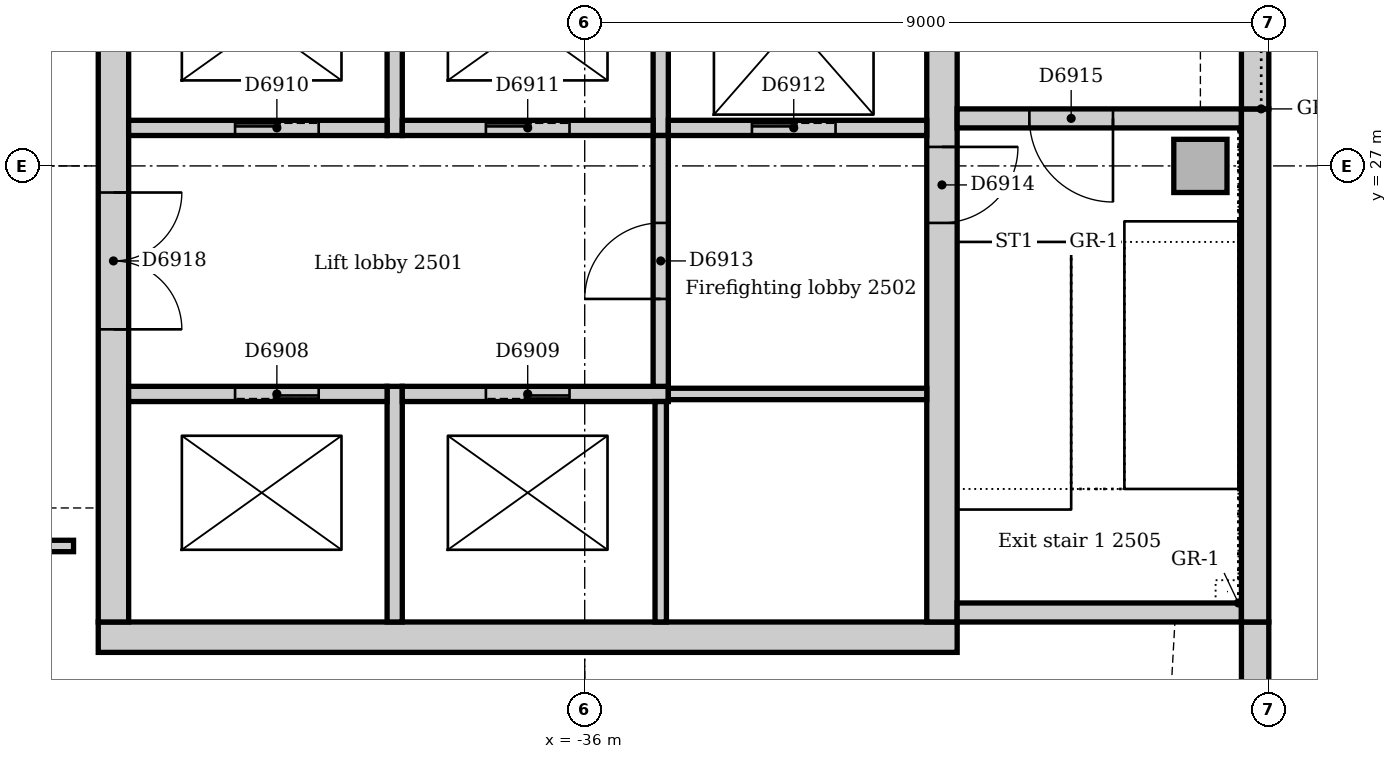
"""IFC4 building model, lengths in metres.
Left out: names, types, materials, properties, quantities, classifications, styles, units other than length and angle.
Written with IfcOpenShell. Run it as: python <this file> out.ifc"""

import sys

from ifc_helpers import new_model, si_unit, direction, frame, frame_2d, origin, origin_2d, place, context, subcontext, project, spatial, rectangle, extrude, element, fill, save


model = new_model("IFC4")
c1 = context("Model", 3, precision=1e-05, world=origin(), true_north=direction((0.0, 1.0)))
c2 = subcontext(c1, "Body", "Model", "MODEL_VIEW")
j1 = project(units=[si_unit("LENGTHUNIT", "METRE"), si_unit("PLANEANGLEUNIT", "RADIAN")], contexts=[c1])
p1 = place(None, origin())
s1 = spatial("IfcSite", under=j1, at=p1, CompositionType="ELEMENT")
p2 = place(p1, origin())
s2 = spatial("IfcBuilding", under=s1, at=p2, CompositionType="ELEMENT")
p3 = place(p2, frame((0.0, 0.0, 108.0)))
s3 = spatial("IfcBuildingStorey", under=s2, at=p3, CompositionType="ELEMENT", Elevation=108.0)
p4 = place(p3, frame((-42.4, 20.8, 0.0), z_axis=(0.0, 0.0, 1.0), x_axis=(1.0, 0.0, 0.0)))
e1 = element("IfcWall", 1, at=p4, inside=s3, PredefinedType="SOLIDWALL", context=c2, shape_type="SweptSolid", body=[
    extrude(rectangle(XDim=11.3, YDim=0.4, at=frame_2d((5.65, 0.0))), origin(), (0.0, 0.0, 1.0), 4.0),
])
p5 = place(p3, frame((-31.3, 21.0, 0.0), z_axis=(0.0, 0.0, 1.0), x_axis=(0.0, 1.0, 0.0)))
e2 = element("IfcWall", 2, at=p5, inside=s3, PredefinedType="SOLIDWALL", context=c2, shape_type="SweptSolid", body=[
    extrude(rectangle(XDim=9.5, YDim=0.4, at=frame_2d((4.75, 0.0))), origin(), (0.0, 0.0, 1.0), 4.0),
])
p6 = place(p5, frame((5.25, 0.0, 0.0)))
e3 = element("IfcOpeningElement", 3, at=p6, cuts=e2, PredefinedType="OPENING", context=c2, shape_type="SweptSolid", body=[
    extrude(rectangle(XDim=1.0, YDim=2.1, at=frame_2d((0.5, 1.05))), frame((0.0, 0.21, 0.0), z_axis=(0.0, -1.0, 0.0), x_axis=(1.0, 0.0, 0.0)), (0.0, 0.0, 1.0), 0.42),
])
p7 = place(p3, frame((-42.2, 30.5, 0.0), z_axis=(0.0, 0.0, 1.0), x_axis=(0.0, -1.0, 0.0)))
e4 = element("IfcWall", 4, at=p7, inside=s3, PredefinedType="SOLIDWALL", context=c2, shape_type="SweptSolid", body=[
    extrude(rectangle(XDim=9.5, YDim=0.4, at=frame_2d((4.75, 0.0))), origin(), (0.0, 0.0, 1.0), 4.0),
])
p8 = place(p7, frame((3.85, 0.0, 0.0)))
e5 = element("IfcOpeningElement", 5, at=p8, cuts=e4, PredefinedType="OPENING", context=c2, shape_type="SweptSolid", body=[
    extrude(rectangle(XDim=1.8, YDim=2.1, at=frame_2d((0.9, 1.05))), frame((0.0, 0.21, 0.0), z_axis=(0.0, -1.0, 0.0), x_axis=(1.0, 0.0, 0.0)), (0.0, 0.0, 1.0), 0.42),
])
p9 = place(p3, frame((-31.1, 21.125, 0.0), z_axis=(0.0, 0.0, 1.0), x_axis=(1.0, 0.0, 0.0)))
e6 = element("IfcWall", 6, at=p9, inside=s3, PredefinedType="SOLIDWALL", context=c2, shape_type="SweptSolid", body=[
    extrude(rectangle(XDim=3.74, YDim=0.25, at=frame_2d((1.87, 0.0))), origin(), (0.0, 0.0, 1.0), 4.0),
])
p10 = place(p3, frame((-27.36, 27.625, 0.0), z_axis=(0.0, 0.0, 1.0), x_axis=(-1.0, 0.0, 0.0)))
e7 = element("IfcWall", 7, at=p10, inside=s3, PredefinedType="SOLIDWALL", context=c2, shape_type="SweptSolid", body=[
    extrude(rectangle(XDim=3.74, YDim=0.25, at=frame_2d((1.87, 0.0))), origin(), (0.0, 0.0, 1.0), 4.0),
])
p11 = place(p10, frame((1.69, 0.0, 0.0)))
e8 = element("IfcOpeningElement", 8, at=p11, cuts=e7, PredefinedType="OPENING", context=c2, shape_type="SweptSolid", body=[
    extrude(rectangle(XDim=1.1, YDim=2.1, at=frame_2d((0.55, 1.05))), frame((0.0, 0.135, 0.0), z_axis=(0.0, -1.0, 0.0), x_axis=(1.0, 0.0, 0.0)), (0.0, 0.0, 1.0), 0.27),
])
p12 = place(p3, frame((-27.9, 27.0, 0.0), z_axis=(0.0, 0.0, 1.0), x_axis=(1.0, 0.0, 0.0)))
e9 = element("IfcColumn", 9, at=p12, inside=s3, PredefinedType="COLUMN", context=c2, shape_type="SweptSolid", body=[
    extrude(rectangle(XDim=0.7, YDim=0.7, at=origin_2d()), origin(), (0.0, 0.0, 1.0), 4.0),
])
p13 = place(p3, frame((-27.18, 17.743, 0.0), z_axis=(0.0, 0.0, 1.0), x_axis=(0.0, 1.0, 0.0)))
e10 = element("IfcWall", 10, at=p13, inside=s3, PredefinedType="STANDARD", context=c2, shape_type="SweptSolid", body=[
    extrude(rectangle(XDim=3.257, YDim=0.36, at=frame_2d((1.629, 0.0))), origin(), (0.0, 0.0, 1.0), 3.85),
])
p14 = place(p3, frame((-27.18, 21.0, 0.0), z_axis=(0.0, 0.0, 1.0), x_axis=(0.0, 1.0, 0.0)))
e11 = element("IfcWall", 11, at=p14, inside=s3, PredefinedType="STANDARD", context=c2, shape_type="SweptSolid", body=[
    extrude(rectangle(XDim=6.75, YDim=0.36, at=frame_2d((3.375, 0.0))), origin(), (0.0, 0.0, 1.0), 3.85),
])
p15 = place(p3, frame((-27.18, 27.75, 0.0), z_axis=(0.0, 0.0, 1.0), x_axis=(0.0, 1.0, 0.0)))
e12 = element("IfcWall", 12, at=p15, inside=s3, PredefinedType="STANDARD", context=c2, shape_type="SweptSolid", body=[
    extrude(rectangle(XDim=7.5, YDim=0.36, at=frame_2d((3.75, 0.0))), origin(), (0.0, 0.0, 1.0), 3.85),
])
p16 = place(p15, frame((2.85, 0.0, 1.2)))
e13 = element("IfcOpeningElement", 13, at=p16, cuts=e12, PredefinedType="OPENING", context=c2, shape_type="SweptSolid", body=[
    extrude(rectangle(XDim=1.8, YDim=1.2, at=frame_2d((0.9, 0.6))), frame((0.0, 0.19, 0.0), z_axis=(0.0, -1.0, 0.0), x_axis=(1.0, 0.0, 0.0)), (0.0, 0.0, 1.0), 0.38),
])
p17 = place(p3, frame((-38.5, 21.0, 0.0), z_axis=(0.0, 0.0, 1.0), x_axis=(0.0, 1.0, 0.0)))
e14 = element("IfcWall", 14, at=p17, inside=s3, PredefinedType="SOLIDWALL", context=c2, shape_type="SweptSolid", body=[
    extrude(rectangle(XDim=3.1, YDim=0.2, at=frame_2d((1.55, 0.0))), origin(), (0.0, 0.0, 1.0), 4.0),
])
p18 = place(p3, frame((-38.6, 24.0, 0.0), z_axis=(0.0, 0.0, 1.0), x_axis=(-1.0, 0.0, 0.0)))
e15 = element("IfcWall", 15, at=p18, inside=s3, PredefinedType="SOLIDWALL", context=c2, shape_type="SweptSolid", body=[
    extrude(rectangle(XDim=3.4, YDim=0.2, at=frame_2d((1.7, 0.0))), origin(), (0.0, 0.0, 1.0), 4.0),
])
p19 = place(p18, frame((0.9, 0.0, 0.0)))
e16 = element("IfcOpeningElement", 16, at=p19, cuts=e15, PredefinedType="OPENING", context=c2, shape_type="SweptSolid", body=[
    extrude(rectangle(XDim=1.1, YDim=2.1, at=frame_2d((0.55, 1.05))), frame((0.0, 0.11, 0.0), z_axis=(0.0, -1.0, 0.0), x_axis=(1.0, 0.0, 0.0)), (0.0, 0.0, 1.0), 0.22),
])
p20 = place(p3, frame((-34.9, 24.0, 0.0), z_axis=(0.0, 0.0, 1.0), x_axis=(-1.0, 0.0, 0.0)))
e17 = element("IfcWall", 17, at=p20, inside=s3, PredefinedType="SOLIDWALL", context=c2, shape_type="SweptSolid", body=[
    extrude(rectangle(XDim=3.5, YDim=0.2, at=frame_2d((1.75, 0.0))), origin(), (0.0, 0.0, 1.0), 4.0),
])
p21 = place(p20, frame((1.3, 0.0, 0.0)))
e18 = element("IfcOpeningElement", 18, at=p21, cuts=e17, PredefinedType="OPENING", context=c2, shape_type="SweptSolid", body=[
    extrude(rectangle(XDim=1.1, YDim=2.1, at=frame_2d((0.55, 1.05))), frame((0.0, 0.11, 0.0), z_axis=(0.0, -1.0, 0.0), x_axis=(1.0, 0.0, 0.0)), (0.0, 0.0, 1.0), 0.22),
])
p22 = place(p3, frame((-38.5, 27.4, 0.0), z_axis=(0.0, 0.0, 1.0), x_axis=(0.0, 1.0, 0.0)))
e19 = element("IfcWall", 19, at=p22, inside=s3, PredefinedType="SOLIDWALL", context=c2, shape_type="SweptSolid", body=[
    extrude(rectangle(XDim=2.85, YDim=0.2, at=frame_2d((1.425, 0.0))), origin(), (0.0, 0.0, 1.0), 4.0),
])
p23 = place(p3, frame((-42.0, 27.5, 0.0), z_axis=(0.0, 0.0, 1.0), x_axis=(1.0, 0.0, 0.0)))
e20 = element("IfcWall", 20, at=p23, inside=s3, PredefinedType="SOLIDWALL", context=c2, shape_type="SweptSolid", body=[
    extrude(rectangle(XDim=3.4, YDim=0.2, at=frame_2d((1.7, 0.0))), origin(), (0.0, 0.0, 1.0), 4.0),
])
p24 = place(p23, frame((1.4, 0.0, 0.0)))
e21 = element("IfcOpeningElement", 21, at=p24, cuts=e20, PredefinedType="OPENING", context=c2, shape_type="SweptSolid", body=[
    extrude(rectangle(XDim=1.1, YDim=2.1, at=frame_2d((0.55, 1.05))), frame((0.0, 0.11, 0.0), z_axis=(0.0, -1.0, 0.0), x_axis=(1.0, 0.0, 0.0)), (0.0, 0.0, 1.0), 0.22),
])
p25 = place(p3, frame((-35.0, 27.4, 0.0), z_axis=(0.0, 0.0, 1.0), x_axis=(0.0, 1.0, 0.0)))
e22 = element("IfcWall", 22, at=p25, inside=s3, PredefinedType="SOLIDWALL", context=c2, shape_type="SweptSolid", body=[
    extrude(rectangle(XDim=2.85, YDim=0.2, at=frame_2d((1.425, 0.0))), origin(), (0.0, 0.0, 1.0), 4.0),
])
p26 = place(p3, frame((-38.4, 27.5, 0.0), z_axis=(0.0, 0.0, 1.0), x_axis=(1.0, 0.0, 0.0)))
e23 = element("IfcWall", 23, at=p26, inside=s3, PredefinedType="SOLIDWALL", context=c2, shape_type="SweptSolid", body=[
    extrude(rectangle(XDim=3.3, YDim=0.2, at=frame_2d((1.65, 0.0))), origin(), (0.0, 0.0, 1.0), 4.0),
])
p27 = place(p26, frame((1.1, 0.0, 0.0)))
e24 = element("IfcOpeningElement", 24, at=p27, cuts=e23, PredefinedType="OPENING", context=c2, shape_type="SweptSolid", body=[
    extrude(rectangle(XDim=1.1, YDim=2.1, at=frame_2d((0.55, 1.05))), frame((0.0, 0.11, 0.0), z_axis=(0.0, -1.0, 0.0), x_axis=(1.0, 0.0, 0.0)), (0.0, 0.0, 1.0), 0.22),
])
p28 = place(p3, frame((-34.9, 27.5, 0.0), z_axis=(0.0, 0.0, 1.0), x_axis=(1.0, 0.0, 0.0)))
e25 = element("IfcWall", 25, at=p28, inside=s3, PredefinedType="SOLIDWALL", context=c2, shape_type="SweptSolid", body=[
    extrude(rectangle(XDim=3.4, YDim=0.2, at=frame_2d((1.7, 0.0))), origin(), (0.0, 0.0, 1.0), 4.0),
])
p29 = place(p28, frame((1.1, 0.0, 0.0)))
e26 = element("IfcOpeningElement", 26, at=p29, cuts=e25, PredefinedType="OPENING", context=c2, shape_type="SweptSolid", body=[
    extrude(rectangle(XDim=1.1, YDim=2.1, at=frame_2d((0.55, 1.05))), frame((0.0, 0.11, 0.0), z_axis=(0.0, -1.0, 0.0), x_axis=(1.0, 0.0, 0.0)), (0.0, 0.0, 1.0), 0.22),
])
p30 = place(p3, frame((-35.0, 24.1, 0.0), z_axis=(0.0, 0.0, 1.0), x_axis=(0.0, 1.0, 0.0)))
e27 = element("IfcWall", 27, at=p30, inside=s3, PredefinedType="SOLIDWALL", context=c2, shape_type="SweptSolid", body=[
    extrude(rectangle(XDim=3.3, YDim=0.2, at=frame_2d((1.65, 0.0))), origin(), (0.0, 0.0, 1.0), 4.0),
])
p31 = place(p30, frame((1.15, 0.0, 0.0)))
e28 = element("IfcOpeningElement", 28, at=p31, cuts=e27, PredefinedType="OPENING", context=c2, shape_type="SweptSolid", body=[
    extrude(rectangle(XDim=1.0, YDim=2.1, at=frame_2d((0.5, 1.05))), frame((0.0, 0.11, 0.0), z_axis=(0.0, -1.0, 0.0), x_axis=(1.0, 0.0, 0.0)), (0.0, 0.0, 1.0), 0.22),
])
p32 = place(p3, frame((-35.0, 21.0, 0.0), z_axis=(0.0, 0.0, 1.0), x_axis=(0.0, 1.0, 0.0)))
e29 = element("IfcWall", 29, at=p32, inside=s3, PredefinedType="SOLIDWALL", context=c2, shape_type="SweptSolid", body=[
    extrude(rectangle(XDim=2.9, YDim=0.15, at=frame_2d((1.45, 0.0))), origin(), (0.0, 0.0, 1.0), 4.0),
])
p33 = place(p3, frame((-31.5, 24.0, 0.0), z_axis=(0.0, 0.0, 1.0), x_axis=(-1.0, 0.0, 0.0)))
e30 = element("IfcWall", 30, at=p33, inside=s3, PredefinedType="SOLIDWALL", context=c2, shape_type="SweptSolid", body=[
    extrude(rectangle(XDim=3.4, YDim=0.15, at=frame_2d((1.7, 0.0))), origin(), (0.0, 0.0, 1.0), 4.0),
])
p34 = place(p3, frame((-59.766, 22.0, 0.0), z_axis=(0.0, 0.0, 1.0), x_axis=(1.0, 0.0, 0.0)))
e31 = element("IfcWall", 31, at=p34, inside=s3, PredefinedType="PARTITIONING", context=c2, shape_type="SweptSolid", body=[
    extrude(rectangle(XDim=17.041, YDim=0.15, at=frame_2d((8.52, 0.0))), origin(), (0.0, 0.0, 1.0), 3.85),
])
p35 = place(p34, frame((15.366, 0.0, 0.0)))
e32 = element("IfcOpeningElement", 32, at=p35, cuts=e31, PredefinedType="OPENING", context=c2, shape_type="SweptSolid", body=[
    extrude(rectangle(XDim=0.9, YDim=2.1, at=frame_2d((0.45, 1.05))), frame((0.0, 0.085, 0.0), z_axis=(0.0, -1.0, 0.0), x_axis=(1.0, 0.0, 0.0)), (0.0, 0.0, 1.0), 0.17),
])
p36 = place(p34, frame((2.5, 0.0, 0.0)))
e33 = element("IfcOpeningElement", 33, at=p36, cuts=e31, PredefinedType="OPENING", context=c2, shape_type="SweptSolid", body=[
    extrude(rectangle(XDim=0.9, YDim=2.1, at=frame_2d((0.45, 1.05))), frame((0.0, 0.085, 0.0), z_axis=(0.0, -1.0, 0.0), x_axis=(1.0, 0.0, 0.0)), (0.0, 0.0, 1.0), 0.17),
])
p37 = place(p34, frame((9.056, 0.0, 0.0)))
e34 = element("IfcOpeningElement", 34, at=p37, cuts=e31, PredefinedType="OPENING", context=c2, shape_type="SweptSolid", body=[
    extrude(rectangle(XDim=1.0, YDim=2.1, at=frame_2d((0.5, 1.05))), frame((0.0, 0.085, 0.0), z_axis=(0.0, -1.0, 0.0), x_axis=(1.0, 0.0, 0.0)), (0.0, 0.0, 1.0), 0.17),
])
p38 = place(p19, origin())
e35 = element("IfcDoor", 35, at=p38, inside=s3, OperationType="SLIDING_TO_LEFT", PredefinedType="DOOR", context=c2, shape_type="SweptSolid", body=[
    extrude(rectangle(XDim=1.1, YDim=2.1, at=frame_2d((0.55, 1.05))), frame((0.0, 0.025, 0.0), z_axis=(0.0, -1.0, 0.0), x_axis=(1.0, 0.0, 0.0)), (0.0, 0.0, 1.0), 0.05),
])
fill(e16, e35)
p39 = place(p21, origin())
e36 = element("IfcDoor", 36, at=p39, inside=s3, OperationType="SLIDING_TO_LEFT", PredefinedType="DOOR", context=c2, shape_type="SweptSolid", body=[
    extrude(rectangle(XDim=1.1, YDim=2.1, at=frame_2d((0.55, 1.05))), frame((0.0, 0.025, 0.0), z_axis=(0.0, -1.0, 0.0), x_axis=(1.0, 0.0, 0.0)), (0.0, 0.0, 1.0), 0.05),
])
fill(e18, e36)
p40 = place(p24, origin())
e37 = element("IfcDoor", 37, at=p40, inside=s3, OperationType="SLIDING_TO_LEFT", PredefinedType="DOOR", context=c2, shape_type="SweptSolid", body=[
    extrude(rectangle(XDim=1.1, YDim=2.1, at=frame_2d((0.55, 1.05))), frame((0.0, 0.025, 0.0), z_axis=(0.0, -1.0, 0.0), x_axis=(1.0, 0.0, 0.0)), (0.0, 0.0, 1.0), 0.05),
])
fill(e21, e37)
p41 = place(p27, origin())
e38 = element("IfcDoor", 38, at=p41, inside=s3, OperationType="SLIDING_TO_LEFT", PredefinedType="DOOR", context=c2, shape_type="SweptSolid", body=[
    extrude(rectangle(XDim=1.1, YDim=2.1, at=frame_2d((0.55, 1.05))), frame((0.0, 0.025, 0.0), z_axis=(0.0, -1.0, 0.0), x_axis=(1.0, 0.0, 0.0)), (0.0, 0.0, 1.0), 0.05),
])
fill(e24, e38)
p42 = place(p29, origin())
e39 = element("IfcDoor", 39, at=p42, inside=s3, OperationType="SLIDING_TO_LEFT", PredefinedType="DOOR", context=c2, shape_type="SweptSolid", body=[
    extrude(rectangle(XDim=1.1, YDim=2.1, at=frame_2d((0.55, 1.05))), frame((0.0, 0.025, 0.0), z_axis=(0.0, -1.0, 0.0), x_axis=(1.0, 0.0, 0.0)), (0.0, 0.0, 1.0), 0.05),
])
fill(e26, e39)
p43 = place(p31, origin())
e40 = element("IfcDoor", 40, at=p43, inside=s3, OperationType="SINGLE_SWING_LEFT", PredefinedType="DOOR", context=c2, shape_type="SweptSolid", body=[
    extrude(rectangle(XDim=1.0, YDim=2.1, at=frame_2d((0.5, 1.05))), frame((0.0, 0.025, 0.0), z_axis=(0.0, -1.0, 0.0), x_axis=(1.0, 0.0, 0.0)), (0.0, 0.0, 1.0), 0.05),
])
fill(e28, e40)
p44 = place(p6, frame((1.0, 0.0, 0.0), z_axis=(0.0, 0.0, 1.0), x_axis=(-1.0, 0.0, 0.0)))
e41 = element("IfcDoor", 41, at=p44, inside=s3, OperationType="SINGLE_SWING_LEFT", PredefinedType="DOOR", context=c2, shape_type="SweptSolid", body=[
    extrude(rectangle(XDim=1.0, YDim=2.1, at=frame_2d((0.5, 1.05))), frame((0.0, 0.025, 0.0), z_axis=(0.0, -1.0, 0.0), x_axis=(1.0, 0.0, 0.0)), (0.0, 0.0, 1.0), 0.05),
])
fill(e3, e41)
p45 = place(p11, origin())
e42 = element("IfcDoor", 42, at=p45, inside=s3, OperationType="SINGLE_SWING_LEFT", PredefinedType="DOOR", context=c2, shape_type="SweptSolid", body=[
    extrude(rectangle(XDim=1.1, YDim=2.1, at=frame_2d((0.55, 1.05))), frame((0.0, 0.025, 0.0), z_axis=(0.0, -1.0, 0.0), x_axis=(1.0, 0.0, 0.0)), (0.0, 0.0, 1.0), 0.05),
])
fill(e8, e42)
p46 = place(p8, origin())
e43 = element("IfcDoor", 43, at=p46, inside=s3, OperationType="DOUBLE_DOOR_SINGLE_SWING", PredefinedType="DOOR", context=c2, shape_type="SweptSolid", body=[
    extrude(rectangle(XDim=1.8, YDim=2.1, at=frame_2d((0.9, 1.05))), frame((0.0, 0.025, 0.0), z_axis=(0.0, -1.0, 0.0), x_axis=(1.0, 0.0, 0.0)), (0.0, 0.0, 1.0), 0.05),
])
fill(e5, e43)
save(model, sys.argv[1])
